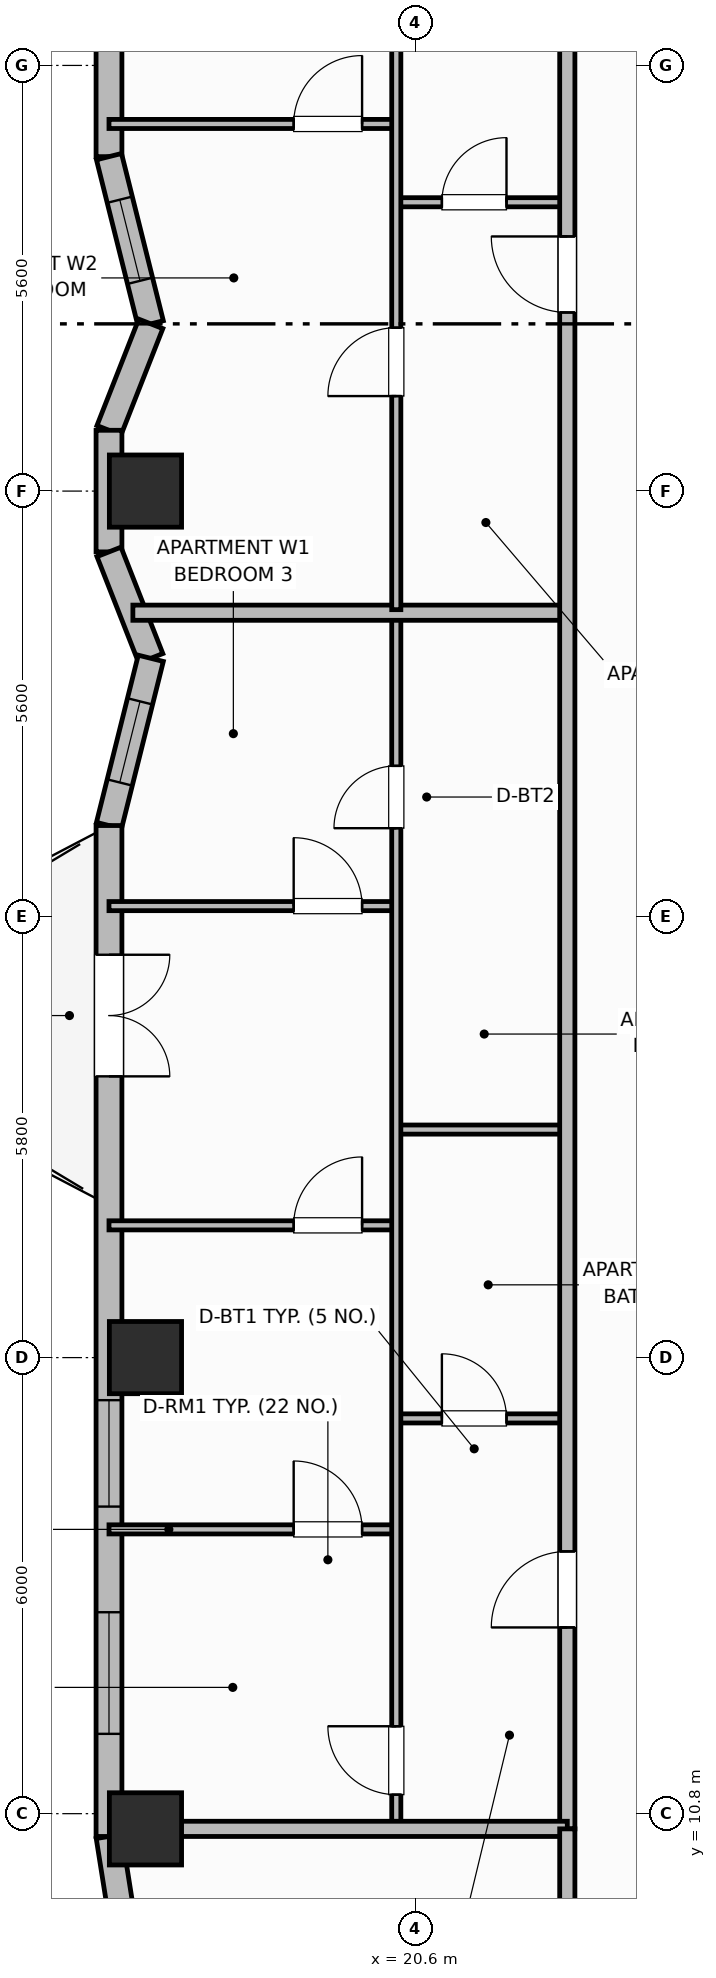
"""IFC4 building model, lengths in metres.
Left out: names, types, materials, properties, quantities, classifications, styles, units other than length and angle.
Written with IfcOpenShell. Run it as: python <this file> out.ifc"""

import sys

from ifc_helpers import new_model, si_unit, direction, frame, frame_2d, origin, origin_2d, place, context, subcontext, project, spatial, rectangle, extrude, element, fill, save


model = new_model("IFC4")
c1 = context("Model", 3, precision=1e-05, world=origin(), true_north=direction((0.0, 1.0)))
c2 = subcontext(c1, "Body", "Model", "MODEL_VIEW")
j1 = project(units=[si_unit("LENGTHUNIT", "METRE"), si_unit("PLANEANGLEUNIT", "RADIAN")], contexts=[c1])
p1 = place(None, origin())
s1 = spatial("IfcSite", under=j1, at=p1, CompositionType="ELEMENT")
p2 = place(p1, origin())
s2 = spatial("IfcBuilding", under=s1, at=p2, CompositionType="ELEMENT")
p3 = place(p2, frame((0.0, 0.0, 147.8)))
s3 = spatial("IfcBuildingStorey", under=s2, at=p3, CompositionType="ELEMENT", Elevation=147.8)
for number, where, z_axis, x_axis in (
    (1, (17.05, 10.6, 0.0), (0.0, 0.0, 1.0), (1.0, 0.0, 0.0)),
    (2, (17.05, 16.8, 0.0), (0.0, 0.0, 1.0), (1.0, 0.0, 0.0)),
    (3, (17.05, 28.2, 0.0), (0.0, 0.0, 1.0), (1.0, 0.0, 0.0)),
):
    element("IfcColumn", number, at=place(p3, frame(where, z_axis=z_axis, x_axis=x_axis)), inside=s3, PredefinedType="COLUMN", context=c2, shape_type="SweptSolid", body=[
        extrude(rectangle(XDim=0.95, YDim=0.95, at=origin_2d()), origin(), (0.0, 0.0, 1.0), 3.7),
    ])
p4 = place(p3, frame((16.57, 10.5, 0.0), z_axis=(0.0, 0.0, 1.0), x_axis=(0.156514556949, -0.987675651954, 0.0)))
e4 = element("IfcWall", 4, at=p4, inside=s3, PredefinedType="SOLIDWALL", context=c2, shape_type="SweptSolid", body=[
    extrude(rectangle(XDim=1.135, YDim=0.34, at=frame_2d((0.568, 0.0))), origin(), (0.0, 0.0, 1.0), 2.72),
])
p5 = place(p3, frame((16.57, 45.9, 0.0), z_axis=(0.0, 0.0, 1.0), x_axis=(0.0, -1.0, 0.0)))
e5 = element("IfcWall", 5, at=p5, inside=s3, PredefinedType="SOLIDWALL", context=c2, shape_type="SweptSolid", body=[
    extrude(rectangle(XDim=13.3, YDim=0.34, at=frame_2d((6.65, 0.0))), origin(), (0.0, 0.0, 1.0), 2.72),
])
p6 = place(p5, frame((1.75, 0.0, 0.75)))
e6 = element("IfcOpeningElement", 6, at=p6, cuts=e5, PredefinedType="OPENING", context=c2, shape_type="SweptSolid", body=[
    extrude(rectangle(XDim=1.8, YDim=1.85, at=frame_2d((0.9, 0.925))), frame((0.0, 0.18, 0.0), z_axis=(0.0, -1.0, 0.0), x_axis=(1.0, 0.0, 0.0)), (0.0, 0.0, 1.0), 0.36),
])
p7 = place(p5, frame((9.75, 0.0, 0.75)))
e7 = element("IfcOpeningElement", 7, at=p7, cuts=e5, PredefinedType="OPENING", context=c2, shape_type="SweptSolid", body=[
    extrude(rectangle(XDim=1.8, YDim=1.85, at=frame_2d((0.9, 0.925))), frame((0.0, 0.18, 0.0), z_axis=(0.0, -1.0, 0.0), x_axis=(1.0, 0.0, 0.0)), (0.0, 0.0, 1.0), 0.36),
])
p8 = place(p3, frame((16.57, 32.6, 0.0), z_axis=(0.0, 0.0, 1.0), x_axis=(0.242535625036, -0.970142500145, 0.0)))
e8 = element("IfcWall", 8, at=p8, inside=s3, PredefinedType="SOLIDWALL", context=c2, shape_type="SweptSolid", body=[
    extrude(rectangle(XDim=2.268, YDim=0.34, at=frame_2d((1.134, 0.0))), origin(), (0.0, 0.0, 1.0), 2.72),
])
p9 = place(p8, frame((0.584, 0.0, 0.91)))
e9 = element("IfcOpeningElement", 9, at=p9, cuts=e8, PredefinedType="OPENING", context=c2, shape_type="SweptSolid", body=[
    extrude(rectangle(XDim=1.1, YDim=1.65, at=frame_2d((0.55, 0.825))), frame((0.0, 0.18, 0.0), z_axis=(0.0, -1.0, 0.0), x_axis=(1.0, 0.0, 0.0)), (0.0, 0.0, 1.0), 0.36),
])
p10 = place(p3, frame((17.12, 30.4, 0.0), z_axis=(0.0, 0.0, 1.0), x_axis=(-0.365702591843, -0.930731762818, 0.0)))
e10 = element("IfcWall", 10, at=p10, inside=s3, PredefinedType="SOLIDWALL", context=c2, shape_type="SweptSolid", body=[
    extrude(rectangle(XDim=1.504, YDim=0.34, at=frame_2d((0.752, 0.0))), origin(), (0.0, 0.0, 1.0), 2.72),
])
p11 = place(p3, frame((16.57, 29.0, 0.0), z_axis=(0.0, 0.0, 1.0), x_axis=(0.0, -1.0, 0.0)))
e11 = element("IfcWall", 11, at=p11, inside=s3, PredefinedType="SOLIDWALL", context=c2, shape_type="SweptSolid", body=[
    extrude(rectangle(XDim=1.6, YDim=0.34, at=frame_2d((0.8, 0.0))), origin(), (0.0, 0.0, 1.0), 2.72),
])
p12 = place(p3, frame((16.57, 27.4, 0.0), z_axis=(0.0, 0.0, 1.0), x_axis=(0.365702591843, -0.930731762818, 0.0)))
e12 = element("IfcWall", 12, at=p12, inside=s3, PredefinedType="SOLIDWALL", context=c2, shape_type="SweptSolid", body=[
    extrude(rectangle(XDim=1.504, YDim=0.34, at=frame_2d((0.752, 0.0))), origin(), (0.0, 0.0, 1.0), 2.72),
])
p13 = place(p3, frame((17.12, 26.0, 0.0), z_axis=(0.0, 0.0, 1.0), x_axis=(-0.242560957029, -0.970136166796, 0.0)))
e13 = element("IfcWall", 13, at=p13, inside=s3, PredefinedType="SOLIDWALL", context=c2, shape_type="SweptSolid", body=[
    extrude(rectangle(XDim=2.268, YDim=0.34, at=frame_2d((1.134, 0.0))), origin(), (0.0, 0.0, 1.0), 2.72),
])
p14 = place(p13, frame((0.584, 0.0, 0.91)))
e14 = element("IfcOpeningElement", 14, at=p14, cuts=e13, PredefinedType="OPENING", context=c2, shape_type="SweptSolid", body=[
    extrude(rectangle(XDim=1.1, YDim=1.65, at=frame_2d((0.55, 0.825))), frame((0.0, 0.18, 0.0), z_axis=(0.0, -1.0, 0.0), x_axis=(1.0, 0.0, 0.0)), (0.0, 0.0, 1.0), 0.36),
])
p15 = place(p3, frame((16.57, 23.8, 0.0), z_axis=(0.0, 0.0, 1.0), x_axis=(0.0, -1.0, 0.0)))
e15 = element("IfcWall", 15, at=p15, inside=s3, PredefinedType="SOLIDWALL", context=c2, shape_type="SweptSolid", body=[
    extrude(rectangle(XDim=13.3, YDim=0.34, at=frame_2d((6.65, 0.0))), origin(), (0.0, 0.0, 1.0), 2.72),
])
p16 = place(p15, frame((1.7, 0.0, 0.0)))
e16 = element("IfcOpeningElement", 16, at=p16, cuts=e15, PredefinedType="OPENING", context=c2, shape_type="SweptSolid", body=[
    extrude(rectangle(XDim=1.6, YDim=2.1, at=frame_2d((0.8, 1.05))), frame((0.0, 0.18, 0.0), z_axis=(0.0, -1.0, 0.0), x_axis=(1.0, 0.0, 0.0)), (0.0, 0.0, 1.0), 0.36),
])
p17 = place(p15, frame((7.56, 0.0, 0.71)))
e17 = element("IfcOpeningElement", 17, at=p17, cuts=e15, PredefinedType="OPENING", context=c2, shape_type="SweptSolid", body=[
    extrude(rectangle(XDim=1.4, YDim=1.85, at=frame_2d((0.7, 0.925))), frame((0.0, 0.18, 0.0), z_axis=(0.0, -1.0, 0.0), x_axis=(1.0, 0.0, 0.0)), (0.0, 0.0, 1.0), 0.36),
])
p18 = place(p15, frame((10.35, 0.0, 0.7)))
e18 = element("IfcOpeningElement", 18, at=p18, cuts=e15, PredefinedType="OPENING", context=c2, shape_type="SweptSolid", body=[
    extrude(rectangle(XDim=1.6, YDim=1.9, at=frame_2d((0.8, 0.95))), frame((0.0, 0.18, 0.0), z_axis=(0.0, -1.0, 0.0), x_axis=(1.0, 0.0, 0.0)), (0.0, 0.0, 1.0), 0.36),
])
p19 = place(p3, frame((20.35, 16.0, 0.0), z_axis=(0.0, 0.0, 1.0), x_axis=(1.0, 0.0, 0.0)))
e19 = element("IfcWall", 19, at=p19, inside=s3, PredefinedType="PARTITIONING", context=c2, shape_type="SweptSolid", body=[
    extrude(rectangle(XDim=2.25, YDim=0.12, at=frame_2d((1.125, 0.0))), origin(), (0.0, 0.0, 1.0), 2.55),
])
p20 = place(p19, frame((0.6, 0.0, 0.0)))
e20 = element("IfcOpeningElement", 20, at=p20, cuts=e19, PredefinedType="OPENING", context=c2, shape_type="SweptSolid", body=[
    extrude(rectangle(XDim=0.85, YDim=2.1, at=frame_2d((0.425, 1.05))), frame((0.0, 0.07, 0.0), z_axis=(0.0, -1.0, 0.0), x_axis=(1.0, 0.0, 0.0)), (0.0, 0.0, 1.0), 0.14),
])
p21 = place(p3, frame((20.35, 19.8, 0.0), z_axis=(0.0, 0.0, 1.0), x_axis=(1.0, 0.0, 0.0)))
e21 = element("IfcWall", 21, at=p21, inside=s3, PredefinedType="PARTITIONING", context=c2, shape_type="SweptSolid", body=[
    extrude(rectangle(XDim=2.25, YDim=0.12, at=frame_2d((1.125, 0.0))), origin(), (0.0, 0.0, 1.0), 2.55),
])
p22 = place(p3, frame((16.57, 14.54, 0.0), z_axis=(0.0, 0.0, 1.0), x_axis=(1.0, 0.0, 0.0)))
e22 = element("IfcWall", 22, at=p22, inside=s3, PredefinedType="PARTITIONING", context=c2, shape_type="SweptSolid", body=[
    extrude(rectangle(XDim=3.78, YDim=0.12, at=frame_2d((1.89, 0.0))), origin(), (0.0, 0.0, 1.0), 2.55),
])
p23 = place(p22, frame((2.43, 0.0, 0.0)))
e23 = element("IfcOpeningElement", 23, at=p23, cuts=e22, PredefinedType="OPENING", context=c2, shape_type="SweptSolid", body=[
    extrude(rectangle(XDim=0.9, YDim=2.1, at=frame_2d((0.45, 1.05))), frame((0.0, 0.07, 0.0), z_axis=(0.0, -1.0, 0.0), x_axis=(1.0, 0.0, 0.0)), (0.0, 0.0, 1.0), 0.14),
])
p24 = place(p3, frame((16.57, 18.54, 0.0), z_axis=(0.0, 0.0, 1.0), x_axis=(1.0, 0.0, 0.0)))
e24 = element("IfcWall", 24, at=p24, inside=s3, PredefinedType="PARTITIONING", context=c2, shape_type="SweptSolid", body=[
    extrude(rectangle(XDim=3.78, YDim=0.12, at=frame_2d((1.89, 0.0))), origin(), (0.0, 0.0, 1.0), 2.55),
])
p25 = place(p24, frame((2.43, 0.0, 0.0)))
e25 = element("IfcOpeningElement", 25, at=p25, cuts=e24, PredefinedType="OPENING", context=c2, shape_type="SweptSolid", body=[
    extrude(rectangle(XDim=0.9, YDim=2.1, at=frame_2d((0.45, 1.05))), frame((0.0, 0.07, 0.0), z_axis=(0.0, -1.0, 0.0), x_axis=(1.0, 0.0, 0.0)), (0.0, 0.0, 1.0), 0.14),
])
p26 = place(p3, frame((16.57, 22.74, 0.0), z_axis=(0.0, 0.0, 1.0), x_axis=(1.0, 0.0, 0.0)))
e26 = element("IfcWall", 26, at=p26, inside=s3, PredefinedType="PARTITIONING", context=c2, shape_type="SweptSolid", body=[
    extrude(rectangle(XDim=3.78, YDim=0.12, at=frame_2d((1.89, 0.0))), origin(), (0.0, 0.0, 1.0), 2.55),
])
p27 = place(p26, frame((2.43, 0.0, 0.0)))
e27 = element("IfcOpeningElement", 27, at=p27, cuts=e26, PredefinedType="OPENING", context=c2, shape_type="SweptSolid", body=[
    extrude(rectangle(XDim=0.9, YDim=2.1, at=frame_2d((0.45, 1.05))), frame((0.0, 0.07, 0.0), z_axis=(0.0, -1.0, 0.0), x_axis=(1.0, 0.0, 0.0)), (0.0, 0.0, 1.0), 0.14),
])
p28 = place(p3, frame((20.35, 10.64, 0.0), z_axis=(0.0, 0.0, 1.0), x_axis=(0.0, 1.0, 0.0)))
e28 = element("IfcWall", 28, at=p28, inside=s3, PredefinedType="PARTITIONING", context=c2, shape_type="SweptSolid", body=[
    extrude(rectangle(XDim=15.92, YDim=0.12, at=frame_2d((7.96, 0.0))), origin(), (0.0, 0.0, 1.0), 2.55),
])
p29 = place(p28, frame((0.41, 0.0, 0.0)))
e29 = element("IfcOpeningElement", 29, at=p29, cuts=e28, PredefinedType="OPENING", context=c2, shape_type="SweptSolid", body=[
    extrude(rectangle(XDim=0.9, YDim=2.1, at=frame_2d((0.45, 1.05))), frame((0.0, 0.07, 0.0), z_axis=(0.0, -1.0, 0.0), x_axis=(1.0, 0.0, 0.0)), (0.0, 0.0, 1.0), 0.14),
])
p30 = place(p28, frame((13.125, 0.0, 0.0)))
e30 = element("IfcOpeningElement", 30, at=p30, cuts=e28, PredefinedType="OPENING", context=c2, shape_type="SweptSolid", body=[
    extrude(rectangle(XDim=0.82, YDim=2.08, at=frame_2d((0.41, 1.04))), frame((0.0, 0.07, 0.0), z_axis=(0.0, -1.0, 0.0), x_axis=(1.0, 0.0, 0.0)), (0.0, 0.0, 1.0), 0.14),
])
p31 = place(p3, frame((16.884, 26.6, 0.0), z_axis=(0.0, 0.0, 1.0), x_axis=(1.0, 0.0, 0.0)))
e31 = element("IfcWall", 31, at=p31, inside=s3, PredefinedType="PARTITIONING", context=c2, shape_type="SweptSolid", body=[
    extrude(rectangle(XDim=5.716, YDim=0.2, at=frame_2d((2.858, 0.0))), origin(), (0.0, 0.0, 1.0), 2.55),
])
p32 = place(p3, frame((20.35, 32.0, 0.0), z_axis=(0.0, 0.0, 1.0), x_axis=(1.0, 0.0, 0.0)))
e32 = element("IfcWall", 32, at=p32, inside=s3, PredefinedType="PARTITIONING", context=c2, shape_type="SweptSolid", body=[
    extrude(rectangle(XDim=2.25, YDim=0.12, at=frame_2d((1.125, 0.0))), origin(), (0.0, 0.0, 1.0), 2.55),
])
p33 = place(p32, frame((0.6, 0.0, 0.0)))
e33 = element("IfcOpeningElement", 33, at=p33, cuts=e32, PredefinedType="OPENING", context=c2, shape_type="SweptSolid", body=[
    extrude(rectangle(XDim=0.85, YDim=2.1, at=frame_2d((0.425, 1.05))), frame((0.0, 0.07, 0.0), z_axis=(0.0, -1.0, 0.0), x_axis=(1.0, 0.0, 0.0)), (0.0, 0.0, 1.0), 0.14),
])
p34 = place(p3, frame((16.57, 33.03, 0.0), z_axis=(0.0, 0.0, 1.0), x_axis=(1.0, 0.0, 0.0)))
e34 = element("IfcWall", 34, at=p34, inside=s3, PredefinedType="PARTITIONING", context=c2, shape_type="SweptSolid", body=[
    extrude(rectangle(XDim=3.78, YDim=0.12, at=frame_2d((1.89, 0.0))), origin(), (0.0, 0.0, 1.0), 2.55),
])
p35 = place(p34, frame((2.43, 0.0, 0.0)))
e35 = element("IfcOpeningElement", 35, at=p35, cuts=e34, PredefinedType="OPENING", context=c2, shape_type="SweptSolid", body=[
    extrude(rectangle(XDim=0.9, YDim=2.1, at=frame_2d((0.45, 1.05))), frame((0.0, 0.07, 0.0), z_axis=(0.0, -1.0, 0.0), x_axis=(1.0, 0.0, 0.0)), (0.0, 0.0, 1.0), 0.14),
])
p36 = place(p3, frame((20.35, 26.64, 0.0), z_axis=(0.0, 0.0, 1.0), x_axis=(0.0, 1.0, 0.0)))
e36 = element("IfcWall", 36, at=p36, inside=s3, PredefinedType="PARTITIONING", context=c2, shape_type="SweptSolid", body=[
    extrude(rectangle(XDim=19.12, YDim=0.12, at=frame_2d((9.56, 0.0))), origin(), (0.0, 0.0, 1.0), 2.55),
])
p37 = place(p36, frame((2.81, 0.0, 0.0)))
e37 = element("IfcOpeningElement", 37, at=p37, cuts=e36, PredefinedType="OPENING", context=c2, shape_type="SweptSolid", body=[
    extrude(rectangle(XDim=0.9, YDim=2.1, at=frame_2d((0.45, 1.05))), frame((0.0, 0.07, 0.0), z_axis=(0.0, -1.0, 0.0), x_axis=(1.0, 0.0, 0.0)), (0.0, 0.0, 1.0), 0.14),
])
p38 = place(p36, frame((15.365, 0.0, 0.0)))
e38 = element("IfcOpeningElement", 38, at=p38, cuts=e36, PredefinedType="OPENING", context=c2, shape_type="SweptSolid", body=[
    extrude(rectangle(XDim=0.82, YDim=2.08, at=frame_2d((0.41, 1.04))), frame((0.0, 0.07, 0.0), z_axis=(0.0, -1.0, 0.0), x_axis=(1.0, 0.0, 0.0)), (0.0, 0.0, 1.0), 0.14),
])
p39 = place(p3, frame((22.6, 10.6, 0.0), z_axis=(0.0, 0.0, 1.0), x_axis=(0.0, 1.0, 0.0)))
e39 = element("IfcWall", 39, at=p39, inside=s3, PredefinedType="PARTITIONING", context=c2, shape_type="SweptSolid", body=[
    extrude(rectangle(XDim=35.2, YDim=0.2, at=frame_2d((17.6, 0.0))), origin(), (0.0, 0.0, 1.0), 2.55),
])
p40 = place(p39, frame((2.65, 0.0, 0.0)))
e40 = element("IfcOpeningElement", 40, at=p40, cuts=e39, PredefinedType="OPENING", context=c2, shape_type="SweptSolid", body=[
    extrude(rectangle(XDim=1.0, YDim=2.15, at=frame_2d((0.5, 1.075))), frame((0.0, 0.11, 0.0), z_axis=(0.0, -1.0, 0.0), x_axis=(1.0, 0.0, 0.0)), (0.0, 0.0, 1.0), 0.22),
])
p41 = place(p39, frame((19.95, 0.0, 0.0)))
e41 = element("IfcOpeningElement", 41, at=p41, cuts=e39, PredefinedType="OPENING", context=c2, shape_type="SweptSolid", body=[
    extrude(rectangle(XDim=1.0, YDim=2.15, at=frame_2d((0.5, 1.075))), frame((0.0, 0.11, 0.0), z_axis=(0.0, -1.0, 0.0), x_axis=(1.0, 0.0, 0.0)), (0.0, 0.0, 1.0), 0.22),
])
p42 = place(p3, frame((16.99, 10.6, 0.0), z_axis=(0.0, 0.0, 1.0), x_axis=(1.0, 0.0, 0.0)))
e42 = element("IfcWall", 42, at=p42, inside=s3, PredefinedType="PARTITIONING", context=c2, shape_type="SweptSolid", body=[
    extrude(rectangle(XDim=5.61, YDim=0.2, at=frame_2d((2.805, 0.0))), origin(), (0.0, 0.0, 1.0), 2.55),
])
p43 = place(p3, frame((22.6, 6.87, 0.0), z_axis=(0.0, 0.0, 1.0), x_axis=(0.0, 1.0, 0.0)))
e43 = element("IfcWall", 43, at=p43, inside=s3, PredefinedType="PARTITIONING", context=c2, shape_type="SweptSolid", body=[
    extrude(rectangle(XDim=3.73, YDim=0.2, at=frame_2d((1.865, 0.0))), origin(), (0.0, 0.0, 1.0), 2.55),
])
p44 = place(p9, origin())
e44 = element("IfcWindow", 44, at=p44, inside=s3, PartitioningType="SINGLE_PANEL", PredefinedType="WINDOW", context=c2, shape_type="SweptSolid", body=[
    extrude(rectangle(XDim=1.1, YDim=1.65, at=frame_2d((0.55, 0.825))), frame((0.0, 0.03, 0.0), z_axis=(0.0, -1.0, 0.0), x_axis=(1.0, 0.0, 0.0)), (0.0, 0.0, 1.0), 0.06),
])
fill(e9, e44)
p45 = place(p14, origin())
e45 = element("IfcWindow", 45, at=p45, inside=s3, PartitioningType="SINGLE_PANEL", PredefinedType="WINDOW", context=c2, shape_type="SweptSolid", body=[
    extrude(rectangle(XDim=1.1, YDim=1.65, at=frame_2d((0.55, 0.825))), frame((0.0, 0.03, 0.0), z_axis=(0.0, -1.0, 0.0), x_axis=(1.0, 0.0, 0.0)), (0.0, 0.0, 1.0), 0.06),
])
fill(e14, e45)
p46 = place(p16, origin())
e46 = element("IfcDoor", 46, at=p46, inside=s3, OperationType="DOUBLE_DOOR_SINGLE_SWING", PredefinedType="DOOR", context=c2, shape_type="SweptSolid", body=[
    extrude(rectangle(XDim=1.6, YDim=2.1, at=frame_2d((0.8, 1.05))), frame((0.0, 0.025, 0.0), z_axis=(0.0, -1.0, 0.0), x_axis=(1.0, 0.0, 0.0)), (0.0, 0.0, 1.0), 0.05),
])
fill(e16, e46)
p47 = place(p17, origin())
e47 = element("IfcWindow", 47, at=p47, inside=s3, PartitioningType="SINGLE_PANEL", PredefinedType="WINDOW", context=c2, shape_type="SweptSolid", body=[
    extrude(rectangle(XDim=1.4, YDim=1.85, at=frame_2d((0.7, 0.925))), frame((0.0, 0.03, 0.0), z_axis=(0.0, -1.0, 0.0), x_axis=(1.0, 0.0, 0.0)), (0.0, 0.0, 1.0), 0.06),
])
fill(e17, e47)
p48 = place(p18, origin())
e48 = element("IfcWindow", 48, at=p48, inside=s3, PartitioningType="SINGLE_PANEL", PredefinedType="WINDOW", context=c2, shape_type="SweptSolid", body=[
    extrude(rectangle(XDim=1.6, YDim=1.9, at=frame_2d((0.8, 0.95))), frame((0.0, 0.03, 0.0), z_axis=(0.0, -1.0, 0.0), x_axis=(1.0, 0.0, 0.0)), (0.0, 0.0, 1.0), 0.06),
])
fill(e18, e48)
p49 = place(p20, origin())
e49 = element("IfcDoor", 49, at=p49, inside=s3, OperationType="SINGLE_SWING_LEFT", PredefinedType="DOOR", context=c2, shape_type="SweptSolid", body=[
    extrude(rectangle(XDim=0.85, YDim=2.1, at=frame_2d((0.425, 1.05))), frame((0.0, 0.025, 0.0), z_axis=(0.0, -1.0, 0.0), x_axis=(1.0, 0.0, 0.0)), (0.0, 0.0, 1.0), 0.05),
])
fill(e20, e49)
p50 = place(p23, origin())
e50 = element("IfcDoor", 50, at=p50, inside=s3, OperationType="SINGLE_SWING_LEFT", PredefinedType="DOOR", context=c2, shape_type="SweptSolid", body=[
    extrude(rectangle(XDim=0.9, YDim=2.1, at=frame_2d((0.45, 1.05))), frame((0.0, 0.025, 0.0), z_axis=(0.0, -1.0, 0.0), x_axis=(1.0, 0.0, 0.0)), (0.0, 0.0, 1.0), 0.05),
])
fill(e23, e50)
p51 = place(p25, origin())
e51 = element("IfcDoor", 51, at=p51, inside=s3, OperationType="SINGLE_SWING_RIGHT", PredefinedType="DOOR", context=c2, shape_type="SweptSolid", body=[
    extrude(rectangle(XDim=0.9, YDim=2.1, at=frame_2d((0.45, 1.05))), frame((0.0, 0.025, 0.0), z_axis=(0.0, -1.0, 0.0), x_axis=(1.0, 0.0, 0.0)), (0.0, 0.0, 1.0), 0.05),
])
fill(e25, e51)
p52 = place(p27, origin())
e52 = element("IfcDoor", 52, at=p52, inside=s3, OperationType="SINGLE_SWING_LEFT", PredefinedType="DOOR", context=c2, shape_type="SweptSolid", body=[
    extrude(rectangle(XDim=0.9, YDim=2.1, at=frame_2d((0.45, 1.05))), frame((0.0, 0.025, 0.0), z_axis=(0.0, -1.0, 0.0), x_axis=(1.0, 0.0, 0.0)), (0.0, 0.0, 1.0), 0.05),
])
fill(e27, e52)
p53 = place(p29, origin())
e53 = element("IfcDoor", 53, at=p53, inside=s3, OperationType="SINGLE_SWING_RIGHT", PredefinedType="DOOR", context=c2, shape_type="SweptSolid", body=[
    extrude(rectangle(XDim=0.9, YDim=2.1, at=frame_2d((0.45, 1.05))), frame((0.0, 0.025, 0.0), z_axis=(0.0, -1.0, 0.0), x_axis=(1.0, 0.0, 0.0)), (0.0, 0.0, 1.0), 0.05),
])
fill(e29, e53)
p54 = place(p30, origin())
e54 = element("IfcDoor", 54, at=p54, inside=s3, OperationType="SINGLE_SWING_LEFT", PredefinedType="DOOR", context=c2, shape_type="SweptSolid", body=[
    extrude(rectangle(XDim=0.82, YDim=2.08, at=frame_2d((0.41, 1.04))), frame((0.0, 0.025, 0.0), z_axis=(0.0, -1.0, 0.0), x_axis=(1.0, 0.0, 0.0)), (0.0, 0.0, 1.0), 0.05),
])
fill(e30, e54)
p55 = place(p33, origin())
e55 = element("IfcDoor", 55, at=p55, inside=s3, OperationType="SINGLE_SWING_RIGHT", PredefinedType="DOOR", context=c2, shape_type="SweptSolid", body=[
    extrude(rectangle(XDim=0.85, YDim=2.1, at=frame_2d((0.425, 1.05))), frame((0.0, 0.025, 0.0), z_axis=(0.0, -1.0, 0.0), x_axis=(1.0, 0.0, 0.0)), (0.0, 0.0, 1.0), 0.05),
])
fill(e33, e55)
p56 = place(p35, origin())
e56 = element("IfcDoor", 56, at=p56, inside=s3, OperationType="SINGLE_SWING_RIGHT", PredefinedType="DOOR", context=c2, shape_type="SweptSolid", body=[
    extrude(rectangle(XDim=0.9, YDim=2.1, at=frame_2d((0.45, 1.05))), frame((0.0, 0.025, 0.0), z_axis=(0.0, -1.0, 0.0), x_axis=(1.0, 0.0, 0.0)), (0.0, 0.0, 1.0), 0.05),
])
fill(e35, e56)
p57 = place(p37, origin())
e57 = element("IfcDoor", 57, at=p57, inside=s3, OperationType="SINGLE_SWING_LEFT", PredefinedType="DOOR", context=c2, shape_type="SweptSolid", body=[
    extrude(rectangle(XDim=0.9, YDim=2.1, at=frame_2d((0.45, 1.05))), frame((0.0, 0.025, 0.0), z_axis=(0.0, -1.0, 0.0), x_axis=(1.0, 0.0, 0.0)), (0.0, 0.0, 1.0), 0.05),
])
fill(e37, e57)
p58 = place(p40, origin())
e58 = element("IfcDoor", 58, at=p58, inside=s3, OperationType="SINGLE_SWING_LEFT", PredefinedType="DOOR", context=c2, shape_type="SweptSolid", body=[
    extrude(rectangle(XDim=1.0, YDim=2.15, at=frame_2d((0.5, 1.075))), frame((0.0, 0.025, 0.0), z_axis=(0.0, -1.0, 0.0), x_axis=(1.0, 0.0, 0.0)), (0.0, 0.0, 1.0), 0.05),
])
fill(e40, e58)
p59 = place(p41, origin())
e59 = element("IfcDoor", 59, at=p59, inside=s3, OperationType="SINGLE_SWING_RIGHT", PredefinedType="DOOR", context=c2, shape_type="SweptSolid", body=[
    extrude(rectangle(XDim=1.0, YDim=2.15, at=frame_2d((0.5, 1.075))), frame((0.0, 0.025, 0.0), z_axis=(0.0, -1.0, 0.0), x_axis=(1.0, 0.0, 0.0)), (0.0, 0.0, 1.0), 0.05),
])
fill(e41, e59)
save(model, sys.argv[1])
